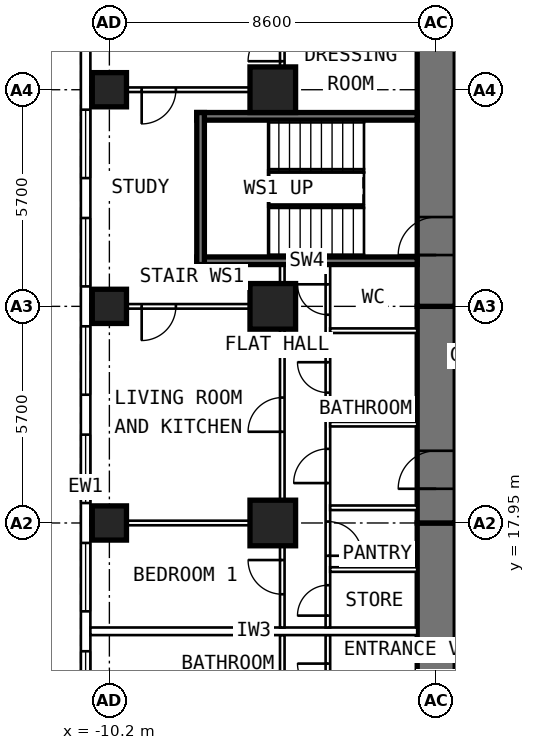
"""IFC4 building model, lengths in metres.
Left out: names, types, materials, properties, quantities, classifications, styles, units other than length and angle.
Written with IfcOpenShell. Run it as: python <this file> out.ifc"""

import sys

from ifc_helpers import new_model, si_unit, direction, frame, frame_2d, origin, origin_2d, place, context, subcontext, project, spatial, rectangle, extrude, element, fill, save


model = new_model("IFC4")
c1 = context("Model", 3, precision=1e-05, world=origin(), true_north=direction((0.0, 1.0)))
c2 = subcontext(c1, "Body", "Model", "MODEL_VIEW")
j1 = project(units=[si_unit("LENGTHUNIT", "METRE"), si_unit("PLANEANGLEUNIT", "RADIAN")], contexts=[c1])
p1 = place(None, origin())
s1 = spatial("IfcSite", under=j1, at=p1, CompositionType="ELEMENT")
p2 = place(p1, origin())
s2 = spatial("IfcBuilding", under=s1, at=p2, CompositionType="ELEMENT")
p3 = place(p2, frame((0.0, 0.0, 102.4)))
s3 = spatial("IfcBuildingStorey", under=s2, at=p3, CompositionType="ELEMENT", Elevation=102.4)
for number, where, z_axis, x_axis in (
    (1, (-10.2, 17.95, 0.0), (0.0, 0.0, 1.0), (0.0, 1.0, 0.0)),
    (2, (-10.2, 23.65, 0.0), (0.0, 0.0, 1.0), (0.0, 1.0, 0.0)),
    (3, (-10.2, 29.35, 0.0), (0.0, 0.0, 1.0), (0.0, 1.0, 0.0)),
):
    element("IfcColumn", number, at=place(p3, frame(where, z_axis=z_axis, x_axis=x_axis)), inside=s3, PredefinedType="COLUMN", context=c2, shape_type="SweptSolid", body=[
        extrude(rectangle(XDim=0.9, YDim=0.9, at=origin_2d()), origin(), (0.0, 0.0, 1.0), 3.6),
    ])
for number, where, z_axis, x_axis in (
    (4, (-5.9, 17.95, 0.0), (0.0, 0.0, 1.0), (0.0, 1.0, 0.0)),
    (5, (-5.9, 23.65, 0.0), (0.0, 0.0, 1.0), (0.0, 1.0, 0.0)),
    (6, (-5.9, 29.35, 0.0), (0.0, 0.0, 1.0), (0.0, 1.0, 0.0)),
):
    element("IfcColumn", number, at=place(p3, frame(where, z_axis=z_axis, x_axis=x_axis)), inside=s3, PredefinedType="COLUMN", context=c2, shape_type="SweptSolid", body=[
        extrude(rectangle(XDim=1.2, YDim=1.2, at=origin_2d()), origin(), (0.0, 0.0, 1.0), 3.6),
    ])
p4 = place(p3, frame((-1.6, 9.6, 0.0), z_axis=(0.0, 0.0, 1.0), x_axis=(0.0, 1.0, 0.0)))
e7 = element("IfcWall", 7, at=p4, inside=s3, PredefinedType="SHEAR", context=c2, shape_type="SweptSolid", body=[
    extrude(rectangle(XDim=8.35, YDim=1.0, at=frame_2d((4.175, 0.0))), origin(), (0.0, 0.0, 1.0), 3.6),
])
p5 = place(p4, frame((1.3, 0.0, 0.0)))
e8 = element("IfcOpeningElement", 8, at=p5, cuts=e7, PredefinedType="OPENING", context=c2, shape_type="SweptSolid", body=[
    extrude(rectangle(XDim=1.0, YDim=2.1, at=frame_2d((0.5, 1.05))), frame((0.0, 0.512, 0.0), z_axis=(0.0, -1.0, 0.0), x_axis=(1.0, 0.0, 0.0)), (0.0, 0.0, 1.0), 1.024),
])
p6 = place(p3, frame((-1.6, 17.95, 0.0), z_axis=(0.0, 0.0, 1.0), x_axis=(0.0, 1.0, 0.0)))
e9 = element("IfcWall", 9, at=p6, inside=s3, PredefinedType="SHEAR", context=c2, shape_type="SweptSolid", body=[
    extrude(rectangle(XDim=5.7, YDim=1.0, at=frame_2d((2.85, 0.0))), origin(), (0.0, 0.0, 1.0), 3.6),
])
p7 = place(p6, frame((0.9, 0.0, 0.0)))
e10 = element("IfcOpeningElement", 10, at=p7, cuts=e9, PredefinedType="OPENING", context=c2, shape_type="SweptSolid", body=[
    extrude(rectangle(XDim=1.0, YDim=2.1, at=frame_2d((0.5, 1.05))), frame((0.0, 0.512, 0.0), z_axis=(0.0, -1.0, 0.0), x_axis=(1.0, 0.0, 0.0)), (0.0, 0.0, 1.0), 1.024),
])
p8 = place(p3, frame((-1.6, 23.65, 0.0), z_axis=(0.0, 0.0, 1.0), x_axis=(0.0, 1.0, 0.0)))
e11 = element("IfcWall", 11, at=p8, inside=s3, PredefinedType="SHEAR", context=c2, shape_type="SweptSolid", body=[
    extrude(rectangle(XDim=10.745, YDim=1.0, at=frame_2d((5.373, 0.0))), origin(), (0.0, 0.0, 1.0), 3.6),
])
p9 = place(p8, frame((1.35, 0.0, 0.0)))
e12 = element("IfcOpeningElement", 12, at=p9, cuts=e11, PredefinedType="OPENING", context=c2, shape_type="SweptSolid", body=[
    extrude(rectangle(XDim=1.0, YDim=2.1, at=frame_2d((0.5, 1.05))), frame((0.0, 0.512, 0.0), z_axis=(0.0, -1.0, 0.0), x_axis=(1.0, 0.0, 0.0)), (0.0, 0.0, 1.0), 1.024),
])
p10 = place(p3, frame((-10.825, 6.148, 0.0), z_axis=(0.0, 0.0, 1.0), x_axis=(0.0, 1.0, 0.0)))
e13 = element("IfcWall", 13, at=p10, inside=s3, PredefinedType="SOLIDWALL", context=c2, shape_type="SweptSolid", body=[
    extrude(rectangle(XDim=25.487, YDim=0.25, at=frame_2d((12.744, 0.0))), origin(), (0.0, 0.0, 1.0), 3.35),
])
p11 = place(p10, frame((0.927, 0.0, 0.8)))
e14 = element("IfcOpeningElement", 14, at=p11, cuts=e13, PredefinedType="OPENING", context=c2, shape_type="SweptSolid", body=[
    extrude(rectangle(XDim=1.8, YDim=1.8, at=frame_2d((0.9, 0.9))), frame((0.0, 0.137, 0.0), z_axis=(0.0, -1.0, 0.0), x_axis=(1.0, 0.0, 0.0)), (0.0, 0.0, 1.0), 0.274),
])
p12 = place(p10, frame((3.777, 0.0, 0.8)))
e15 = element("IfcOpeningElement", 15, at=p12, cuts=e13, PredefinedType="OPENING", context=c2, shape_type="SweptSolid", body=[
    extrude(rectangle(XDim=1.8, YDim=1.8, at=frame_2d((0.9, 0.9))), frame((0.0, 0.137, 0.0), z_axis=(0.0, -1.0, 0.0), x_axis=(1.0, 0.0, 0.0)), (0.0, 0.0, 1.0), 0.274),
])
p13 = place(p10, frame((6.627, 0.0, 0.8)))
e16 = element("IfcOpeningElement", 16, at=p13, cuts=e13, PredefinedType="OPENING", context=c2, shape_type="SweptSolid", body=[
    extrude(rectangle(XDim=1.8, YDim=1.8, at=frame_2d((0.9, 0.9))), frame((0.0, 0.137, 0.0), z_axis=(0.0, -1.0, 0.0), x_axis=(1.0, 0.0, 0.0)), (0.0, 0.0, 1.0), 0.274),
])
p14 = place(p10, frame((9.477, 0.0, 0.8)))
e17 = element("IfcOpeningElement", 17, at=p14, cuts=e13, PredefinedType="OPENING", context=c2, shape_type="SweptSolid", body=[
    extrude(rectangle(XDim=1.8, YDim=1.8, at=frame_2d((0.9, 0.9))), frame((0.0, 0.137, 0.0), z_axis=(0.0, -1.0, 0.0), x_axis=(1.0, 0.0, 0.0)), (0.0, 0.0, 1.0), 0.274),
])
p15 = place(p10, frame((12.327, 0.0, 0.8)))
e18 = element("IfcOpeningElement", 18, at=p15, cuts=e13, PredefinedType="OPENING", context=c2, shape_type="SweptSolid", body=[
    extrude(rectangle(XDim=1.8, YDim=1.8, at=frame_2d((0.9, 0.9))), frame((0.0, 0.137, 0.0), z_axis=(0.0, -1.0, 0.0), x_axis=(1.0, 0.0, 0.0)), (0.0, 0.0, 1.0), 0.274),
])
p16 = place(p10, frame((15.177, 0.0, 0.8)))
e19 = element("IfcOpeningElement", 19, at=p16, cuts=e13, PredefinedType="OPENING", context=c2, shape_type="SweptSolid", body=[
    extrude(rectangle(XDim=1.8, YDim=1.8, at=frame_2d((0.9, 0.9))), frame((0.0, 0.137, 0.0), z_axis=(0.0, -1.0, 0.0), x_axis=(1.0, 0.0, 0.0)), (0.0, 0.0, 1.0), 0.274),
])
p17 = place(p10, frame((18.027, 0.0, 0.8)))
e20 = element("IfcOpeningElement", 20, at=p17, cuts=e13, PredefinedType="OPENING", context=c2, shape_type="SweptSolid", body=[
    extrude(rectangle(XDim=1.8, YDim=1.8, at=frame_2d((0.9, 0.9))), frame((0.0, 0.137, 0.0), z_axis=(0.0, -1.0, 0.0), x_axis=(1.0, 0.0, 0.0)), (0.0, 0.0, 1.0), 0.274),
])
p18 = place(p10, frame((20.877, 0.0, 0.8)))
e21 = element("IfcOpeningElement", 21, at=p18, cuts=e13, PredefinedType="OPENING", context=c2, shape_type="SweptSolid", body=[
    extrude(rectangle(XDim=1.8, YDim=1.8, at=frame_2d((0.9, 0.9))), frame((0.0, 0.137, 0.0), z_axis=(0.0, -1.0, 0.0), x_axis=(1.0, 0.0, 0.0)), (0.0, 0.0, 1.0), 0.274),
])
p19 = place(p3, frame((-4.45, 10.1, 0.0), z_axis=(0.0, 0.0, 1.0), x_axis=(0.0, 1.0, 0.0)))
e22 = element("IfcWall", 22, at=p19, inside=s3, PredefinedType="PARTITIONING", context=c2, shape_type="SweptSolid", body=[
    extrude(rectangle(XDim=4.9, YDim=0.12, at=frame_2d((2.45, 0.0))), origin(), (0.0, 0.0, 1.0), 3.35),
])
p20 = place(p19, frame((0.75, 0.0, 0.0)))
e23 = element("IfcOpeningElement", 23, at=p20, cuts=e22, PredefinedType="OPENING", context=c2, shape_type="SweptSolid", body=[
    extrude(rectangle(XDim=0.9, YDim=2.1, at=frame_2d((0.45, 1.05))), frame((0.0, 0.072, 0.0), z_axis=(0.0, -1.0, 0.0), x_axis=(1.0, 0.0, 0.0)), (0.0, 0.0, 1.0), 0.144),
])
p21 = place(p19, frame((3.35, 0.0, 0.0)))
e24 = element("IfcOpeningElement", 24, at=p21, cuts=e22, PredefinedType="OPENING", context=c2, shape_type="SweptSolid", body=[
    extrude(rectangle(XDim=0.8, YDim=2.1, at=frame_2d((0.4, 1.05))), frame((0.0, 0.072, 0.0), z_axis=(0.0, -1.0, 0.0), x_axis=(1.0, 0.0, 0.0)), (0.0, 0.0, 1.0), 0.144),
])
p22 = place(p3, frame((-5.65, 9.6, 0.0), z_axis=(0.0, 0.0, 1.0), x_axis=(0.0, 1.0, 0.0)))
e25 = element("IfcWall", 25, at=p22, inside=s3, PredefinedType="PARTITIONING", context=c2, shape_type="SweptSolid", body=[
    extrude(rectangle(XDim=5.4, YDim=0.12, at=frame_2d((2.7, 0.0))), origin(), (0.0, 0.0, 1.0), 3.35),
])
p23 = place(p22, frame((3.4, 0.0, 0.0)))
e26 = element("IfcOpeningElement", 26, at=p23, cuts=e25, PredefinedType="OPENING", context=c2, shape_type="SweptSolid", body=[
    extrude(rectangle(XDim=0.9, YDim=2.1, at=frame_2d((0.45, 1.05))), frame((0.0, 0.072, 0.0), z_axis=(0.0, -1.0, 0.0), x_axis=(1.0, 0.0, 0.0)), (0.0, 0.0, 1.0), 0.144),
])
p24 = place(p3, frame((-4.45, 15.2, 0.0), z_axis=(0.0, 0.0, 1.0), x_axis=(0.0, 1.0, 0.0)))
e27 = element("IfcWall", 27, at=p24, inside=s3, PredefinedType="PARTITIONING", context=c2, shape_type="SweptSolid", body=[
    extrude(rectangle(XDim=9.55, YDim=0.12, at=frame_2d((4.775, 0.0))), origin(), (0.0, 0.0, 1.0), 3.35),
])
p25 = place(p24, frame((0.312, 0.0, 0.0)))
e28 = element("IfcOpeningElement", 28, at=p25, cuts=e27, PredefinedType="OPENING", context=c2, shape_type="SweptSolid", body=[
    extrude(rectangle(XDim=0.8, YDim=2.1, at=frame_2d((0.4, 1.05))), frame((0.0, 0.072, 0.0), z_axis=(0.0, -1.0, 0.0), x_axis=(1.0, 0.0, 0.0)), (0.0, 0.0, 1.0), 0.144),
])
p26 = place(p24, frame((1.887, 0.0, 0.0)))
e29 = element("IfcOpeningElement", 29, at=p26, cuts=e27, PredefinedType="OPENING", context=c2, shape_type="SweptSolid", body=[
    extrude(rectangle(XDim=0.9, YDim=2.1, at=frame_2d((0.45, 1.05))), frame((0.0, 0.072, 0.0), z_axis=(0.0, -1.0, 0.0), x_axis=(1.0, 0.0, 0.0)), (0.0, 0.0, 1.0), 0.144),
])
p27 = place(p24, frame((3.8, 0.0, 0.0)))
e30 = element("IfcOpeningElement", 30, at=p27, cuts=e27, PredefinedType="OPENING", context=c2, shape_type="SweptSolid", body=[
    extrude(rectangle(XDim=0.9, YDim=2.1, at=frame_2d((0.45, 1.05))), frame((0.0, 0.072, 0.0), z_axis=(0.0, -1.0, 0.0), x_axis=(1.0, 0.0, 0.0)), (0.0, 0.0, 1.0), 0.144),
])
p28 = place(p24, frame((6.18, 0.0, 0.0)))
e31 = element("IfcOpeningElement", 31, at=p28, cuts=e27, PredefinedType="OPENING", context=c2, shape_type="SweptSolid", body=[
    extrude(rectangle(XDim=0.8, YDim=2.1, at=frame_2d((0.4, 1.05))), frame((0.0, 0.072, 0.0), z_axis=(0.0, -1.0, 0.0), x_axis=(1.0, 0.0, 0.0)), (0.0, 0.0, 1.0), 0.144),
])
p29 = place(p24, frame((8.23, 0.0, 0.0)))
e32 = element("IfcOpeningElement", 32, at=p29, cuts=e27, PredefinedType="OPENING", context=c2, shape_type="SweptSolid", body=[
    extrude(rectangle(XDim=0.8, YDim=2.1, at=frame_2d((0.4, 1.05))), frame((0.0, 0.072, 0.0), z_axis=(0.0, -1.0, 0.0), x_axis=(1.0, 0.0, 0.0)), (0.0, 0.0, 1.0), 0.144),
])
p30 = place(p3, frame((-5.65, 15.2, 0.0), z_axis=(0.0, 0.0, 1.0), x_axis=(0.0, 1.0, 0.0)))
e33 = element("IfcWall", 33, at=p30, inside=s3, PredefinedType="PARTITIONING", context=c2, shape_type="SweptSolid", body=[
    extrude(rectangle(XDim=9.55, YDim=0.12, at=frame_2d((4.775, 0.0))), origin(), (0.0, 0.0, 1.0), 3.35),
])
p31 = place(p30, frame((0.875, 0.0, 0.0)))
e34 = element("IfcOpeningElement", 34, at=p31, cuts=e33, PredefinedType="OPENING", context=c2, shape_type="SweptSolid", body=[
    extrude(rectangle(XDim=0.9, YDim=2.1, at=frame_2d((0.45, 1.05))), frame((0.0, 0.072, 0.0), z_axis=(0.0, -1.0, 0.0), x_axis=(1.0, 0.0, 0.0)), (0.0, 0.0, 1.0), 0.144),
])
p32 = place(p30, frame((5.15, 0.0, 0.0)))
e35 = element("IfcOpeningElement", 35, at=p32, cuts=e33, PredefinedType="OPENING", context=c2, shape_type="SweptSolid", body=[
    extrude(rectangle(XDim=0.9, YDim=2.1, at=frame_2d((0.45, 1.05))), frame((0.0, 0.072, 0.0), z_axis=(0.0, -1.0, 0.0), x_axis=(1.0, 0.0, 0.0)), (0.0, 0.0, 1.0), 0.144),
])
p33 = place(p3, frame((-5.71, 17.95, 0.0), z_axis=(0.0, 0.0, 1.0), x_axis=(-1.0, 0.0, 0.0)))
e36 = element("IfcWall", 36, at=p33, inside=s3, PredefinedType="PARTITIONING", context=c2, shape_type="SweptSolid", body=[
    extrude(rectangle(XDim=4.99, YDim=0.12, at=frame_2d((2.495, 0.0))), origin(), (0.0, 0.0, 1.0), 2.45),
])
for number, where, z_axis, x_axis in (
    (37, (-2.1, 16.725, 0.0), (0.0, 0.0, 1.0), (-1.0, 0.0, 0.0)),
    (38, (-2.1, 18.35, 0.0), (0.0, 0.0, 1.0), (-1.0, 0.0, 0.0)),
    (39, (-2.1, 20.55, 0.0), (0.0, 0.0, 1.0), (-1.0, 0.0, 0.0)),
    (40, (-2.1, 23.01, 0.0), (0.0, 0.0, 1.0), (-1.0, 0.0, 0.0)),
):
    element("IfcWall", number, at=place(p3, frame(where, z_axis=z_axis, x_axis=x_axis)), inside=s3, PredefinedType="PARTITIONING", context=c2, shape_type="SweptSolid", body=[
        extrude(rectangle(XDim=2.29, YDim=0.12, at=frame_2d((1.145, 0.0))), origin(), (0.0, 0.0, 1.0), 3.35),
    ])
p34 = place(p3, frame((-2.1, 15.1, 0.0), z_axis=(0.0, 0.0, 1.0), x_axis=(-1.0, 0.0, 0.0)))
e41 = element("IfcWall", 41, at=p34, inside=s3, PredefinedType="PARTITIONING", context=c2, shape_type="SweptSolid", body=[
    extrude(rectangle(XDim=8.6, YDim=0.2, at=frame_2d((4.3, 0.0))), origin(), (0.0, 0.0, 1.0), 3.35),
])
p35 = place(p3, frame((-5.71, 23.65, 0.0), z_axis=(0.0, 0.0, 1.0), x_axis=(-1.0, 0.0, 0.0)))
e42 = element("IfcWall", 42, at=p35, inside=s3, PredefinedType="PARTITIONING", context=c2, shape_type="SweptSolid", body=[
    extrude(rectangle(XDim=4.99, YDim=0.12, at=frame_2d((2.495, 0.0))), origin(), (0.0, 0.0, 1.0), 2.45),
])
p36 = place(p35, frame((2.74, 0.0, 0.0)))
e43 = element("IfcOpeningElement", 43, at=p36, cuts=e42, PredefinedType="OPENING", context=c2, shape_type="SweptSolid", body=[
    extrude(rectangle(XDim=0.9, YDim=2.1, at=frame_2d((0.45, 1.05))), frame((0.0, 0.072, 0.0), z_axis=(0.0, -1.0, 0.0), x_axis=(1.0, 0.0, 0.0)), (0.0, 0.0, 1.0), 0.144),
])
p37 = place(p3, frame((-5.71, 29.35, 0.0), z_axis=(0.0, 0.0, 1.0), x_axis=(-1.0, 0.0, 0.0)))
e44 = element("IfcWall", 44, at=p37, inside=s3, PredefinedType="PARTITIONING", context=c2, shape_type="SweptSolid", body=[
    extrude(rectangle(XDim=4.99, YDim=0.12, at=frame_2d((2.495, 0.0))), origin(), (0.0, 0.0, 1.0), 2.45),
])
p38 = place(p37, frame((2.74, 0.0, 0.0)))
e45 = element("IfcOpeningElement", 45, at=p38, cuts=e44, PredefinedType="OPENING", context=c2, shape_type="SweptSolid", body=[
    extrude(rectangle(XDim=0.9, YDim=2.1, at=frame_2d((0.45, 1.05))), frame((0.0, 0.072, 0.0), z_axis=(0.0, -1.0, 0.0), x_axis=(1.0, 0.0, 0.0)), (0.0, 0.0, 1.0), 0.144),
])
p39 = place(p3, frame((-5.65, 28.95, 0.0), z_axis=(0.0, 0.0, 1.0), x_axis=(0.0, 1.0, 0.0)))
e46 = element("IfcWall", 46, at=p39, inside=s3, PredefinedType="PARTITIONING", context=c2, shape_type="SweptSolid", body=[
    extrude(rectangle(XDim=5.445, YDim=0.12, at=frame_2d((2.723, 0.0))), origin(), (0.0, 0.0, 1.0), 3.35),
])
p40 = place(p39, frame((1.15, 0.0, 0.0)))
e47 = element("IfcOpeningElement", 47, at=p40, cuts=e46, PredefinedType="OPENING", context=c2, shape_type="SweptSolid", body=[
    extrude(rectangle(XDim=0.9, YDim=2.1, at=frame_2d((0.45, 1.05))), frame((0.0, 0.072, 0.0), z_axis=(0.0, -1.0, 0.0), x_axis=(1.0, 0.0, 0.0)), (0.0, 0.0, 1.0), 0.144),
])
for number, where, z_axis, x_axis in (
    (48, (-2.1, 24.85, 0.0), (0.0, 0.0, 1.0), (-1.0, 0.0, 0.0)),
    (49, (-2.1, 28.65, 0.0), (0.0, 0.0, 1.0), (-1.0, 0.0, 0.0)),
):
    element("IfcWall", number, at=place(p3, frame(where, z_axis=z_axis, x_axis=x_axis)), inside=s3, PredefinedType="SHEAR", context=c2, shape_type="SweptSolid", body=[
        extrude(rectangle(XDim=5.8, YDim=0.2, at=frame_2d((2.9, 0.0))), origin(), (0.0, 0.0, 1.0), 3.33),
    ])
p41 = place(p3, frame((-7.8, 24.75, 0.0), z_axis=(0.0, 0.0, 1.0), x_axis=(0.0, 1.0, 0.0)))
e50 = element("IfcWall", 50, at=p41, inside=s3, PredefinedType="SHEAR", context=c2, shape_type="SweptSolid", body=[
    extrude(rectangle(XDim=4.0, YDim=0.2, at=frame_2d((2.0, 0.0))), origin(), (0.0, 0.0, 1.0), 3.33),
])
p42 = place(p13, origin())
e51 = element("IfcWindow", 51, at=p42, inside=s3, PartitioningType="SINGLE_PANEL", PredefinedType="WINDOW", context=c2, shape_type="SweptSolid", body=[
    extrude(rectangle(XDim=1.8, YDim=1.8, at=frame_2d((0.9, 0.9))), frame((0.0, 0.03, 0.0), z_axis=(0.0, -1.0, 0.0), x_axis=(1.0, 0.0, 0.0)), (0.0, 0.0, 1.0), 0.06),
])
fill(e16, e51)
p43 = place(p14, origin())
e52 = element("IfcWindow", 52, at=p43, inside=s3, PartitioningType="SINGLE_PANEL", PredefinedType="WINDOW", context=c2, shape_type="SweptSolid", body=[
    extrude(rectangle(XDim=1.8, YDim=1.8, at=frame_2d((0.9, 0.9))), frame((0.0, 0.03, 0.0), z_axis=(0.0, -1.0, 0.0), x_axis=(1.0, 0.0, 0.0)), (0.0, 0.0, 1.0), 0.06),
])
fill(e17, e52)
p44 = place(p15, origin())
e53 = element("IfcWindow", 53, at=p44, inside=s3, PartitioningType="SINGLE_PANEL", PredefinedType="WINDOW", context=c2, shape_type="SweptSolid", body=[
    extrude(rectangle(XDim=1.8, YDim=1.8, at=frame_2d((0.9, 0.9))), frame((0.0, 0.03, 0.0), z_axis=(0.0, -1.0, 0.0), x_axis=(1.0, 0.0, 0.0)), (0.0, 0.0, 1.0), 0.06),
])
fill(e18, e53)
p45 = place(p16, origin())
e54 = element("IfcWindow", 54, at=p45, inside=s3, PartitioningType="SINGLE_PANEL", PredefinedType="WINDOW", context=c2, shape_type="SweptSolid", body=[
    extrude(rectangle(XDim=1.8, YDim=1.8, at=frame_2d((0.9, 0.9))), frame((0.0, 0.03, 0.0), z_axis=(0.0, -1.0, 0.0), x_axis=(1.0, 0.0, 0.0)), (0.0, 0.0, 1.0), 0.06),
])
fill(e19, e54)
p46 = place(p17, origin())
e55 = element("IfcWindow", 55, at=p46, inside=s3, PartitioningType="SINGLE_PANEL", PredefinedType="WINDOW", context=c2, shape_type="SweptSolid", body=[
    extrude(rectangle(XDim=1.8, YDim=1.8, at=frame_2d((0.9, 0.9))), frame((0.0, 0.03, 0.0), z_axis=(0.0, -1.0, 0.0), x_axis=(1.0, 0.0, 0.0)), (0.0, 0.0, 1.0), 0.06),
])
fill(e20, e55)
p47 = place(p18, origin())
e56 = element("IfcWindow", 56, at=p47, inside=s3, PartitioningType="SINGLE_PANEL", PredefinedType="WINDOW", context=c2, shape_type="SweptSolid", body=[
    extrude(rectangle(XDim=1.8, YDim=1.8, at=frame_2d((0.9, 0.9))), frame((0.0, 0.03, 0.0), z_axis=(0.0, -1.0, 0.0), x_axis=(1.0, 0.0, 0.0)), (0.0, 0.0, 1.0), 0.06),
])
fill(e21, e56)
p48 = place(p21, origin())
e57 = element("IfcDoor", 57, at=p48, inside=s3, OperationType="SINGLE_SWING_RIGHT", PredefinedType="DOOR", context=c2, shape_type="SweptSolid", body=[
    extrude(rectangle(XDim=0.8, YDim=2.1, at=frame_2d((0.4, 1.05))), frame((0.0, 0.025, 0.0), z_axis=(0.0, -1.0, 0.0), x_axis=(1.0, 0.0, 0.0)), (0.0, 0.0, 1.0), 0.05),
])
fill(e24, e57)
p49 = place(p7, origin())
e58 = element("IfcDoor", 58, at=p49, inside=s3, OperationType="SINGLE_SWING_LEFT", PredefinedType="DOOR", context=c2, shape_type="SweptSolid", body=[
    extrude(rectangle(XDim=1.0, YDim=2.1, at=frame_2d((0.5, 1.05))), frame((0.0, 0.25, 0.0), z_axis=(0.0, -1.0, 0.0), x_axis=(1.0, 0.0, 0.0)), (0.0, 0.0, 1.0), 0.5),
])
fill(e10, e58)
p50 = place(p31, origin())
e59 = element("IfcDoor", 59, at=p50, inside=s3, OperationType="SINGLE_SWING_RIGHT", PredefinedType="DOOR", context=c2, shape_type="SweptSolid", body=[
    extrude(rectangle(XDim=0.9, YDim=2.1, at=frame_2d((0.45, 1.05))), frame((0.0, 0.025, 0.0), z_axis=(0.0, -1.0, 0.0), x_axis=(1.0, 0.0, 0.0)), (0.0, 0.0, 1.0), 0.05),
])
fill(e34, e59)
p51 = place(p32, origin())
e60 = element("IfcDoor", 60, at=p51, inside=s3, OperationType="SINGLE_SWING_LEFT", PredefinedType="DOOR", context=c2, shape_type="SweptSolid", body=[
    extrude(rectangle(XDim=0.9, YDim=2.1, at=frame_2d((0.45, 1.05))), frame((0.0, 0.025, 0.0), z_axis=(0.0, -1.0, 0.0), x_axis=(1.0, 0.0, 0.0)), (0.0, 0.0, 1.0), 0.05),
])
fill(e35, e60)
p52 = place(p25, origin())
e61 = element("IfcDoor", 61, at=p52, inside=s3, OperationType="SINGLE_SWING_LEFT", PredefinedType="DOOR", context=c2, shape_type="SweptSolid", body=[
    extrude(rectangle(XDim=0.8, YDim=2.1, at=frame_2d((0.4, 1.05))), frame((0.0, 0.025, 0.0), z_axis=(0.0, -1.0, 0.0), x_axis=(1.0, 0.0, 0.0)), (0.0, 0.0, 1.0), 0.05),
])
fill(e28, e61)
p53 = place(p26, frame((0.9, 0.0, 0.0), z_axis=(0.0, 0.0, 1.0), x_axis=(-1.0, 0.0, 0.0)))
e62 = element("IfcDoor", 62, at=p53, inside=s3, OperationType="SINGLE_SWING_RIGHT", PredefinedType="DOOR", context=c2, shape_type="SweptSolid", body=[
    extrude(rectangle(XDim=0.9, YDim=2.1, at=frame_2d((0.45, 1.05))), frame((0.0, 0.025, 0.0), z_axis=(0.0, -1.0, 0.0), x_axis=(1.0, 0.0, 0.0)), (0.0, 0.0, 1.0), 0.05),
])
fill(e29, e62)
p54 = place(p27, origin())
e63 = element("IfcDoor", 63, at=p54, inside=s3, OperationType="SINGLE_SWING_LEFT", PredefinedType="DOOR", context=c2, shape_type="SweptSolid", body=[
    extrude(rectangle(XDim=0.9, YDim=2.1, at=frame_2d((0.45, 1.05))), frame((0.0, 0.025, 0.0), z_axis=(0.0, -1.0, 0.0), x_axis=(1.0, 0.0, 0.0)), (0.0, 0.0, 1.0), 0.05),
])
fill(e30, e63)
p55 = place(p28, origin())
e64 = element("IfcDoor", 64, at=p55, inside=s3, OperationType="SINGLE_SWING_RIGHT", PredefinedType="DOOR", context=c2, shape_type="SweptSolid", body=[
    extrude(rectangle(XDim=0.8, YDim=2.1, at=frame_2d((0.4, 1.05))), frame((0.0, 0.025, 0.0), z_axis=(0.0, -1.0, 0.0), x_axis=(1.0, 0.0, 0.0)), (0.0, 0.0, 1.0), 0.05),
])
fill(e31, e64)
p56 = place(p29, origin())
e65 = element("IfcDoor", 65, at=p56, inside=s3, OperationType="SINGLE_SWING_RIGHT", PredefinedType="DOOR", context=c2, shape_type="SweptSolid", body=[
    extrude(rectangle(XDim=0.8, YDim=2.1, at=frame_2d((0.4, 1.05))), frame((0.0, 0.025, 0.0), z_axis=(0.0, -1.0, 0.0), x_axis=(1.0, 0.0, 0.0)), (0.0, 0.0, 1.0), 0.05),
])
fill(e32, e65)
p57 = place(p38, origin())
e66 = element("IfcDoor", 66, at=p57, inside=s3, OperationType="SINGLE_SWING_RIGHT", PredefinedType="DOOR", context=c2, shape_type="SweptSolid", body=[
    extrude(rectangle(XDim=0.9, YDim=2.1, at=frame_2d((0.45, 1.05))), frame((0.0, 0.025, 0.0), z_axis=(0.0, -1.0, 0.0), x_axis=(1.0, 0.0, 0.0)), (0.0, 0.0, 1.0), 0.05),
])
fill(e45, e66)
p58 = place(p40, origin())
e67 = element("IfcDoor", 67, at=p58, inside=s3, OperationType="SINGLE_SWING_LEFT", PredefinedType="DOOR", context=c2, shape_type="SweptSolid", body=[
    extrude(rectangle(XDim=0.9, YDim=2.1, at=frame_2d((0.45, 1.05))), frame((0.0, 0.025, 0.0), z_axis=(0.0, -1.0, 0.0), x_axis=(1.0, 0.0, 0.0)), (0.0, 0.0, 1.0), 0.05),
])
fill(e47, e67)
p59 = place(p36, origin())
e68 = element("IfcDoor", 68, at=p59, inside=s3, OperationType="SINGLE_SWING_RIGHT", PredefinedType="DOOR", context=c2, shape_type="SweptSolid", body=[
    extrude(rectangle(XDim=0.9, YDim=2.1, at=frame_2d((0.45, 1.05))), frame((0.0, 0.025, 0.0), z_axis=(0.0, -1.0, 0.0), x_axis=(1.0, 0.0, 0.0)), (0.0, 0.0, 1.0), 0.05),
])
fill(e43, e68)
p60 = place(p9, origin())
e69 = element("IfcDoor", 69, at=p60, inside=s3, OperationType="SINGLE_SWING_LEFT", PredefinedType="DOOR", context=c2, shape_type="SweptSolid", body=[
    extrude(rectangle(XDim=1.0, YDim=2.1, at=frame_2d((0.5, 1.05))), frame((0.0, 0.25, 0.0), z_axis=(0.0, -1.0, 0.0), x_axis=(1.0, 0.0, 0.0)), (0.0, 0.0, 1.0), 0.5),
])
fill(e12, e69)
save(model, sys.argv[1])
